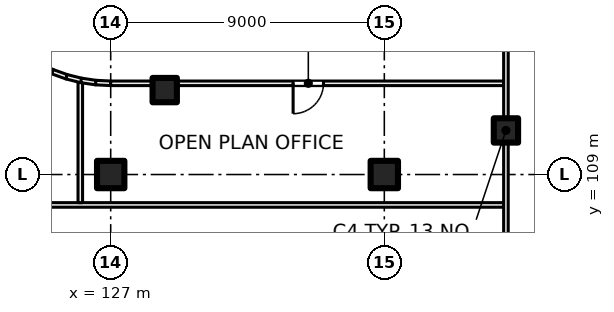
"""IFC4 building model, lengths in metres.
Left out: names, types, materials, properties, quantities, classifications, styles, units other than length and angle.
Written with IfcOpenShell. Run it as: python <this file> out.ifc"""

import sys

from ifc_helpers import new_model, si_unit, direction, frame, frame_2d, origin, origin_2d, place, context, subcontext, project, spatial, rectangle, extrude, element, fill, save


model = new_model("IFC4")
c1 = context("Model", 3, precision=1e-05, world=origin(), true_north=direction((0.0, 1.0)))
c2 = subcontext(c1, "Body", "Model", "MODEL_VIEW")
j1 = project(units=[si_unit("LENGTHUNIT", "METRE"), si_unit("PLANEANGLEUNIT", "RADIAN")], contexts=[c1])
p1 = place(None, origin())
s1 = spatial("IfcSite", under=j1, at=p1, CompositionType="ELEMENT")
p2 = place(p1, origin())
s2 = spatial("IfcBuilding", under=s1, at=p2, CompositionType="ELEMENT")
p3 = place(p2, frame((0.0, 0.0, 12.5)))
s3 = spatial("IfcBuildingStorey", under=s2, at=p3, CompositionType="ELEMENT", Elevation=12.5)
for number, where, z_axis, x_axis in (
    (1, (127.0, 109.0, 0.0), (0.0, 0.0, 1.0), (1.0, 0.0, 0.0)),
    (2, (136.0, 109.0, 0.0), (0.0, 0.0, 1.0), (1.0, 0.0, 0.0)),
):
    element("IfcColumn", number, at=place(p3, frame(where, z_axis=z_axis, x_axis=x_axis)), inside=s3, PredefinedType="COLUMN", context=c2, shape_type="SweptSolid", body=[
        extrude(rectangle(XDim=0.9, YDim=0.9, at=origin_2d()), origin(), (0.0, 0.0, 1.0), 5.0),
    ])
for number, where, z_axis, x_axis in (
    (3, (128.777, 111.777, 0.0), (0.0, 0.0, 1.0), (1.0, 0.0, 0.0)),
    (4, (140.0, 110.45, 0.0), (0.0, 0.0, 1.0), (1.0, 0.0, 0.0)),
):
    element("IfcColumn", number, at=place(p3, frame(where, z_axis=z_axis, x_axis=x_axis)), inside=s3, PredefinedType="COLUMN", context=c2, shape_type="SweptSolid", body=[
        extrude(rectangle(XDim=0.8, YDim=0.8, at=origin_2d()), origin(), (0.0, 0.0, 1.0), 5.0),
    ])
p4 = place(p3, frame((121.368, 108.0, 0.0), z_axis=(0.0, 0.0, 1.0), x_axis=(1.0, 0.0, 0.0)))
e5 = element("IfcWall", 5, at=p4, inside=s3, PredefinedType="PARTITIONING", context=c2, shape_type="SweptSolid", body=[
    extrude(rectangle(XDim=18.557, YDim=0.15, at=frame_2d((9.279, 0.0))), origin(), (0.0, 0.0, 1.0), 4.6),
])
for number, where, z_axis, x_axis in (
    (6, (124.64, 112.592, 0.0), (0.0, 0.0, 1.0), (0.904, -0.428, 0.0)),
    (7, (125.084, 112.382, 0.0), (0.0, 0.0, 1.0), (0.941, -0.337, 0.0)),
):
    element("IfcWall", number, at=place(p3, frame(where, z_axis=z_axis, x_axis=x_axis)), inside=s3, PredefinedType="PARTITIONING", context=c2, shape_type="SweptSolid", body=[
        extrude(rectangle(XDim=0.498, YDim=0.15, at=frame_2d((0.249, 0.0))), origin(), (0.0, 0.0, 1.0), 4.6),
    ])
p5 = place(p3, frame((125.545, 112.216, 0.0), z_axis=(0.0, 0.0, 1.0), x_axis=(0.970116111764, -0.242641154168, 0.0)))
e8 = element("IfcWall", 8, at=p5, inside=s3, PredefinedType="PARTITIONING", context=c2, shape_type="SweptSolid", body=[
    extrude(rectangle(XDim=0.544, YDim=0.15, at=frame_2d((0.272, 0.0))), origin(), (0.0, 0.0, 1.0), 4.6),
])
p6 = place(p3, frame((126.0, 108.075, 0.0), z_axis=(0.0, 0.0, 1.0), x_axis=(0.0, 1.0, 0.0)))
e9 = element("IfcWall", 9, at=p6, inside=s3, PredefinedType="PARTITIONING", context=c2, shape_type="SweptSolid", body=[
    extrude(rectangle(XDim=3.95, YDim=0.15, at=frame_2d((1.975, 0.0))), origin(), (0.0, 0.0, 1.0), 4.6),
])
p7 = place(p3, frame((126.025, 112.096, 0.0), z_axis=(0.0, 0.0, 1.0), x_axis=(0.989041138834, -0.147640189971, 0.0)))
e10 = element("IfcWall", 10, at=p7, inside=s3, PredefinedType="PARTITIONING", context=c2, shape_type="SweptSolid", body=[
    extrude(rectangle(XDim=0.494, YDim=0.15, at=frame_2d((0.247, 0.0))), origin(), (0.0, 0.0, 1.0), 4.6),
])
p8 = place(p3, frame((126.506, 112.024, 0.0), z_axis=(0.0, 0.0, 1.0), x_axis=(0.998837896651, -0.048196018647, 0.0)))
e11 = element("IfcWall", 11, at=p8, inside=s3, PredefinedType="PARTITIONING", context=c2, shape_type="SweptSolid", body=[
    extrude(rectangle(XDim=0.496, YDim=0.15, at=frame_2d((0.248, 0.0))), origin(), (0.0, 0.0, 1.0), 4.6),
])
p9 = place(p3, frame((139.925, 112.0, 0.0), z_axis=(0.0, 0.0, 1.0), x_axis=(-1.0, 0.0, 0.0)))
e12 = element("IfcWall", 12, at=p9, inside=s3, PredefinedType="PARTITIONING", context=c2, shape_type="SweptSolid", body=[
    extrude(rectangle(XDim=12.927, YDim=0.15, at=frame_2d((6.463, 0.0))), origin(), (0.0, 0.0, 1.0), 4.6),
])
p10 = place(p9, frame((5.925, 0.0, 0.0)))
e13 = element("IfcOpeningElement", 13, at=p10, cuts=e12, PredefinedType="OPENING", context=c2, shape_type="SweptSolid", body=[
    extrude(rectangle(XDim=1.0, YDim=2.1, at=frame_2d((0.5, 1.05))), frame((0.0, 0.085, 0.0), z_axis=(0.0, -1.0, 0.0), x_axis=(1.0, 0.0, 0.0)), (0.0, 0.0, 1.0), 0.17),
])
p11 = place(p3, frame((140.0, 102.925, 0.0), z_axis=(0.0, 0.0, 1.0), x_axis=(0.0, 1.0, 0.0)))
e14 = element("IfcWall", 14, at=p11, inside=s3, PredefinedType="PARTITIONING", context=c2, shape_type="SweptSolid", body=[
    extrude(rectangle(XDim=14.075, YDim=0.15, at=frame_2d((7.038, 0.0))), origin(), (0.0, 0.0, 1.0), 4.6),
])
p12 = place(p11, frame((10.675, 0.0, 0.0)))
e15 = element("IfcOpeningElement", 15, at=p12, cuts=e14, PredefinedType="OPENING", context=c2, shape_type="SweptSolid", body=[
    extrude(rectangle(XDim=1.8, YDim=2.1, at=frame_2d((0.9, 1.05))), frame((0.0, 0.085, 0.0), z_axis=(0.0, -1.0, 0.0), x_axis=(1.0, 0.0, 0.0)), (0.0, 0.0, 1.0), 0.17),
])
p13 = place(p10, origin())
e16 = element("IfcDoor", 16, at=p13, inside=s3, OperationType="SINGLE_SWING_RIGHT", PredefinedType="DOOR", context=c2, shape_type="SweptSolid", body=[
    extrude(rectangle(XDim=1.0, YDim=2.1, at=frame_2d((0.5, 1.05))), frame((0.0, 0.025, 0.0), z_axis=(0.0, -1.0, 0.0), x_axis=(1.0, 0.0, 0.0)), (0.0, 0.0, 1.0), 0.05),
])
fill(e13, e16)
save(model, sys.argv[1])
